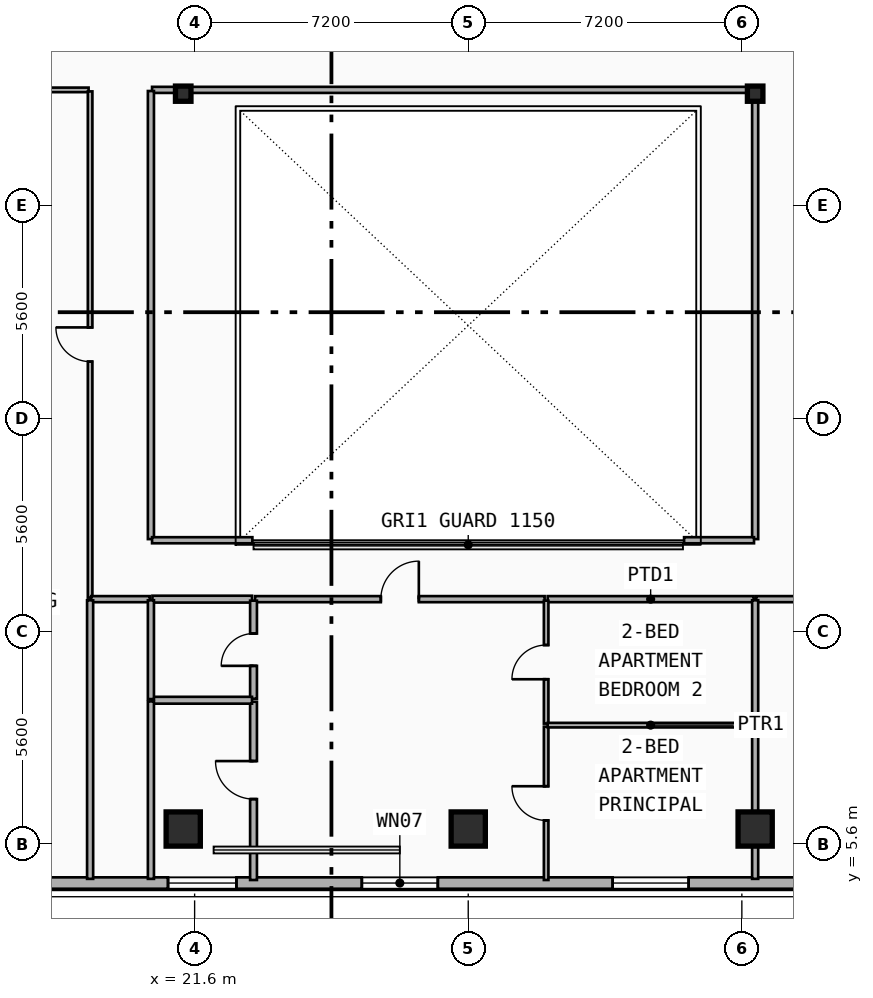
"""IFC4 building model, lengths in metres.
Left out: names, types, materials, properties, quantities, classifications, styles, units other than length and angle.
Written with IfcOpenShell. Run it as: python <this file> out.ifc"""

import sys

from ifc_helpers import new_model, si_unit, direction, frame, frame_2d, origin, origin_2d, place, context, subcontext, project, spatial, rectangle, i_section, extrude, element, fill, save


model = new_model("IFC4")
c1 = context("Model", 3, precision=1e-05, world=origin(), true_north=direction((0.0, 1.0)))
c2 = subcontext(c1, "Body", "Model", "MODEL_VIEW")
j1 = project(units=[si_unit("LENGTHUNIT", "METRE"), si_unit("PLANEANGLEUNIT", "RADIAN")], contexts=[c1])
p1 = place(None, origin())
s1 = spatial("IfcSite", under=j1, at=p1, CompositionType="ELEMENT")
p2 = place(p1, origin())
s2 = spatial("IfcBuilding", under=s1, at=p2, CompositionType="ELEMENT")
p3 = place(p2, frame((0.0, 0.0, 222.0)))
s3 = spatial("IfcBuildingStorey", under=s2, at=p3, CompositionType="ELEMENT", Elevation=222.0)
for number, where, z_axis, x_axis in (
    (1, (21.3, 25.35, 0.0), (0.0, 0.0, 1.0), (1.0, 0.0, 0.0)),
    (2, (36.35, 25.35, 0.0), (0.0, 0.0, 1.0), (1.0, 0.0, 0.0)),
):
    element("IfcColumn", number, at=place(p3, frame(where, z_axis=z_axis, x_axis=x_axis)), inside=s3, PredefinedType="COLUMN", context=c2, shape_type="SweptSolid", body=[
        extrude(i_section(OverallWidth=0.408, OverallDepth=0.4, WebThickness=0.025, FlangeThickness=0.039, FilletRadius=0.015, at=origin_2d()), origin(), (0.0, 0.0, 1.0), 3.6),
    ])
for number, where, z_axis, x_axis in (
    (3, (21.3, 6.11, 0.0), (0.0, -0.09, 0.996), (1.0, 0.0, 0.0)),
    (4, (28.8, 6.11, 0.0), (0.0, -0.09, 0.996), (1.0, 0.0, 0.0)),
    (5, (36.35, 6.11, 0.0), (0.0, -0.09, 0.996), (1.0, 0.0, 0.0)),
):
    element("IfcColumn", number, at=place(p3, frame(where, z_axis=z_axis, x_axis=x_axis)), inside=s3, PredefinedType="COLUMN", context=c2, shape_type="SweptSolid", body=[
        extrude(rectangle(XDim=0.9, YDim=0.9, at=origin_2d()), origin(), (0.0, 0.0, 1.0), 3.615),
    ])
p4 = place(p3, frame((48.0, 4.58, 0.0), z_axis=(0.0, 0.0, 1.0), x_axis=(-1.0, 0.0, 0.0)))
e6 = element("IfcWall", 6, at=p4, inside=s3, PredefinedType="SOLIDWALL", context=c2, shape_type="SweptSolid", body=[
    extrude(rectangle(XDim=38.4, YDim=0.3, at=frame_2d((19.2, 0.0))), origin(), (0.0, 0.0, 1.0), 3.34),
])
p5 = place(p4, frame((36.19, 0.0, 0.48)))
e7 = element("IfcOpeningElement", 7, at=p5, cuts=e6, PredefinedType="OPENING", context=c2, shape_type="SweptSolid", body=[
    extrude(rectangle(XDim=1.8, YDim=1.8, at=frame_2d((0.9, 0.9))), frame((0.0, 0.16, 0.0), z_axis=(0.0, -1.0, 0.0), x_axis=(1.0, 0.0, 0.0)), (0.0, 0.0, 1.0), 0.32),
])
p6 = place(p4, frame((33.912, 0.0, 1.05)))
e8 = element("IfcOpeningElement", 8, at=p6, cuts=e6, PredefinedType="OPENING", context=c2, shape_type="SweptSolid", body=[
    extrude(rectangle(XDim=1.2, YDim=1.5, at=frame_2d((0.6, 0.75))), frame((0.0, 0.16, 0.0), z_axis=(0.0, -1.0, 0.0), x_axis=(1.0, 0.0, 0.0)), (0.0, 0.0, 1.0), 0.32),
])
p7 = place(p4, frame((20.0, 0.0, 0.65)))
e9 = element("IfcOpeningElement", 9, at=p7, cuts=e6, PredefinedType="OPENING", context=c2, shape_type="SweptSolid", body=[
    extrude(rectangle(XDim=2.0, YDim=2.2, at=frame_2d((1.0, 1.1))), frame((0.0, 0.16, 0.0), z_axis=(0.0, -1.0, 0.0), x_axis=(1.0, 0.0, 0.0)), (0.0, 0.0, 1.0), 0.32),
])
p8 = place(p4, frame((25.3, 0.0, 0.48)))
e10 = element("IfcOpeningElement", 10, at=p8, cuts=e6, PredefinedType="OPENING", context=c2, shape_type="SweptSolid", body=[
    extrude(rectangle(XDim=1.8, YDim=1.8, at=frame_2d((0.9, 0.9))), frame((0.0, 0.16, 0.0), z_axis=(0.0, -1.0, 0.0), x_axis=(1.0, 0.0, 0.0)), (0.0, 0.0, 1.0), 0.32),
])
p9 = place(p4, frame((13.4, 0.0, 0.65)))
e11 = element("IfcOpeningElement", 11, at=p9, cuts=e6, PredefinedType="OPENING", context=c2, shape_type="SweptSolid", body=[
    extrude(rectangle(XDim=2.0, YDim=2.2, at=frame_2d((1.0, 1.1))), frame((0.0, 0.16, 0.0), z_axis=(0.0, -1.0, 0.0), x_axis=(1.0, 0.0, 0.0)), (0.0, 0.0, 1.0), 0.32),
])
p10 = place(p4, frame((2.9, 0.0, 0.34)))
e12 = element("IfcOpeningElement", 12, at=p10, cuts=e6, PredefinedType="OPENING", context=c2, shape_type="SweptSolid", body=[
    extrude(rectangle(XDim=1.8, YDim=1.8, at=frame_2d((0.9, 0.9))), frame((0.0, 0.16, 0.0), z_axis=(0.0, -1.0, 0.0), x_axis=(1.0, 0.0, 0.0)), (0.0, 0.0, 1.0), 0.32),
])
p11 = place(p4, frame((0.41, 0.0, 0.48)))
e13 = element("IfcOpeningElement", 13, at=p11, cuts=e6, PredefinedType="OPENING", context=c2, shape_type="SweptSolid", body=[
    extrude(rectangle(XDim=1.8, YDim=1.8, at=frame_2d((0.9, 0.9))), frame((0.0, 0.16, 0.0), z_axis=(0.0, -1.0, 0.0), x_axis=(1.0, 0.0, 0.0)), (0.0, 0.0, 1.0), 0.32),
])
p12 = place(p3, frame((12.24, 25.45, 0.0), z_axis=(0.0, 0.0, 1.0), x_axis=(1.0, 0.0, 0.0)))
e14 = element("IfcWall", 14, at=p12, inside=s3, PredefinedType="PARTITIONING", context=c2, shape_type="SweptSolid", body=[
    extrude(rectangle(XDim=6.57, YDim=0.12, at=frame_2d((3.285, 0.0))), origin(), (0.0, 0.0, 1.0), 2.52),
])
p13 = place(p12, frame((2.835, 0.0, 0.0)))
e15 = element("IfcOpeningElement", 15, at=p13, cuts=e14, PredefinedType="OPENING", context=c2, shape_type="SweptSolid", body=[
    extrude(rectangle(XDim=0.9, YDim=2.1, at=frame_2d((0.45, 1.05))), frame((0.0, 0.07, 0.0), z_axis=(0.0, -1.0, 0.0), x_axis=(1.0, 0.0, 0.0)), (0.0, 0.0, 1.0), 0.14),
])
p14 = place(p3, frame((18.85, 12.09, 0.0), z_axis=(0.0, 0.0, 1.0), x_axis=(0.0, 1.0, 0.0)))
e16 = element("IfcWall", 16, at=p14, inside=s3, PredefinedType="PARTITIONING", context=c2, shape_type="SweptSolid", body=[
    extrude(rectangle(XDim=13.32, YDim=0.12, at=frame_2d((6.66, 0.0))), origin(), (0.0, 0.0, 1.0), 2.82),
])
p15 = place(p14, frame((6.21, 0.0, 0.0)))
e17 = element("IfcOpeningElement", 17, at=p15, cuts=e16, PredefinedType="OPENING", context=c2, shape_type="SweptSolid", body=[
    extrude(rectangle(XDim=0.9, YDim=2.1, at=frame_2d((0.45, 1.05))), frame((0.0, 0.07, 0.0), z_axis=(0.0, -1.0, 0.0), x_axis=(1.0, 0.0, 0.0)), (0.0, 0.0, 1.0), 0.14),
])
p16 = place(p3, frame((23.19, 12.05, 0.0), z_axis=(0.0, 0.0, 1.0), x_axis=(1.0, 0.0, 0.0)))
e18 = element("IfcWall", 18, at=p16, inside=s3, PredefinedType="PARTITIONING", context=c2, shape_type="SweptSolid", body=[
    extrude(rectangle(XDim=7.62, YDim=0.16, at=frame_2d((3.81, 0.0))), origin(), (0.0, 0.0, 1.0), 2.52),
])
p17 = place(p16, frame((3.31, 0.0, 0.0)))
e19 = element("IfcOpeningElement", 19, at=p17, cuts=e18, PredefinedType="OPENING", context=c2, shape_type="SweptSolid", body=[
    extrude(rectangle(XDim=1.0, YDim=2.15, at=frame_2d((0.5, 1.075))), frame((0.0, 0.09, 0.0), z_axis=(0.0, -1.0, 0.0), x_axis=(1.0, 0.0, 0.0)), (0.0, 0.0, 1.0), 0.18),
])
p18 = place(p3, frame((20.49, 12.05, 0.0), z_axis=(0.0, 0.0, 1.0), x_axis=(1.0, 0.0, 0.0)))
e20 = element("IfcWall", 20, at=p18, inside=s3, PredefinedType="PLUMBINGWALL", context=c2, shape_type="SweptSolid", body=[
    extrude(rectangle(XDim=2.62, YDim=0.18, at=frame_2d((1.31, 0.0))), origin(), (0.0, 0.0, 1.0), 2.52),
])
p19 = place(p3, frame((30.89, 12.05, 0.0), z_axis=(0.0, 0.0, 1.0), x_axis=(1.0, 0.0, 0.0)))
e21 = element("IfcWall", 21, at=p19, inside=s3, PredefinedType="PARTITIONING", context=c2, shape_type="SweptSolid", body=[
    extrude(rectangle(XDim=5.42, YDim=0.16, at=frame_2d((2.71, 0.0))), origin(), (0.0, 0.0, 1.0), 2.52),
])
p20 = place(p3, frame((23.15, 4.66, 0.0), z_axis=(0.0, 0.0, 1.0), x_axis=(0.0, 1.0, 0.0)))
e22 = element("IfcWall", 22, at=p20, inside=s3, PredefinedType="PLUMBINGWALL", context=c2, shape_type="SweptSolid", body=[
    extrude(rectangle(XDim=4.69, YDim=0.18, at=frame_2d((2.345, 0.0))), origin(), (0.0, 0.0, 1.0), 2.96),
])
p21 = place(p20, frame((2.129, 0.0, 0.0)))
e23 = element("IfcOpeningElement", 23, at=p21, cuts=e22, PredefinedType="OPENING", context=c2, shape_type="SweptSolid", body=[
    extrude(rectangle(XDim=1.0, YDim=2.15, at=frame_2d((0.5, 1.075))), frame((0.0, 0.1, 0.0), z_axis=(0.0, -1.0, 0.0), x_axis=(1.0, 0.0, 0.0)), (0.0, 0.0, 1.0), 0.2),
])
p22 = place(p3, frame((23.15, 9.43, 0.0), z_axis=(0.0, 0.0, 1.0), x_axis=(0.0, 1.0, 0.0)))
e24 = element("IfcWall", 24, at=p22, inside=s3, PredefinedType="PLUMBINGWALL", context=c2, shape_type="SweptSolid", body=[
    extrude(rectangle(XDim=2.58, YDim=0.18, at=frame_2d((1.29, 0.0))), origin(), (0.0, 0.0, 1.0), 2.96),
])
p23 = place(p22, frame((0.865, 0.0, 0.0)))
e25 = element("IfcOpeningElement", 25, at=p23, cuts=e24, PredefinedType="OPENING", context=c2, shape_type="SweptSolid", body=[
    extrude(rectangle(XDim=0.85, YDim=2.1, at=frame_2d((0.425, 1.05))), frame((0.0, 0.1, 0.0), z_axis=(0.0, -1.0, 0.0), x_axis=(1.0, 0.0, 0.0)), (0.0, 0.0, 1.0), 0.2),
])
p24 = place(p3, frame((30.85, 4.66, 0.0), z_axis=(0.0, 0.0, 1.0), x_axis=(0.0, 1.0, 0.0)))
e26 = element("IfcWall", 26, at=p24, inside=s3, PredefinedType="PARTITIONING", context=c2, shape_type="SweptSolid", body=[
    extrude(rectangle(XDim=4.035, YDim=0.12, at=frame_2d((2.018, 0.0))), origin(), (0.0, 0.0, 1.0), 3.0),
])
p25 = place(p24, frame((1.567, 0.0, 0.0)))
e27 = element("IfcOpeningElement", 27, at=p25, cuts=e26, PredefinedType="OPENING", context=c2, shape_type="SweptSolid", body=[
    extrude(rectangle(XDim=0.9, YDim=2.1, at=frame_2d((0.45, 1.05))), frame((0.0, 0.07, 0.0), z_axis=(0.0, -1.0, 0.0), x_axis=(1.0, 0.0, 0.0)), (0.0, 0.0, 1.0), 0.14),
])
p26 = place(p3, frame((30.85, 8.775, 0.0), z_axis=(0.0, 0.0, 1.0), x_axis=(0.0, 1.0, 0.0)))
e28 = element("IfcWall", 28, at=p26, inside=s3, PredefinedType="PARTITIONING", context=c2, shape_type="SweptSolid", body=[
    extrude(rectangle(XDim=3.235, YDim=0.12, at=frame_2d((1.618, 0.0))), origin(), (0.0, 0.0, 1.0), 2.96),
])
p27 = place(p26, frame((1.167, 0.0, 0.0)))
e29 = element("IfcOpeningElement", 29, at=p27, cuts=e28, PredefinedType="OPENING", context=c2, shape_type="SweptSolid", body=[
    extrude(rectangle(XDim=0.9, YDim=2.1, at=frame_2d((0.45, 1.05))), frame((0.0, 0.07, 0.0), z_axis=(0.0, -1.0, 0.0), x_axis=(1.0, 0.0, 0.0)), (0.0, 0.0, 1.0), 0.14),
])
p28 = place(p3, frame((20.49, 9.39, 0.0), z_axis=(0.0, 0.0, 1.0), x_axis=(1.0, 0.0, 0.0)))
e30 = element("IfcWall", 30, at=p28, inside=s3, PredefinedType="PLUMBINGWALL", context=c2, shape_type="SweptSolid", body=[
    extrude(rectangle(XDim=2.62, YDim=0.18, at=frame_2d((1.31, 0.0))), origin(), (0.0, 0.0, 1.0), 2.52),
])
p29 = place(p3, frame((30.89, 8.735, 0.0), z_axis=(0.0, 0.0, 1.0), x_axis=(1.0, 0.0, 0.0)))
e31 = element("IfcWall", 31, at=p29, inside=s3, PredefinedType="PARTITIONING", context=c2, shape_type="SweptSolid", body=[
    extrude(rectangle(XDim=5.42, YDim=0.12, at=frame_2d((2.71, 0.0))), origin(), (0.0, 0.0, 1.0), 2.52),
])
p30 = place(p3, frame((20.48, 25.45, 0.0), z_axis=(0.0, 0.0, 1.0), x_axis=(1.0, 0.0, 0.0)))
e32 = element("IfcWall", 32, at=p30, inside=s3, PredefinedType="PARTITIONING", context=c2, shape_type="SweptSolid", body=[
    extrude(rectangle(XDim=15.84, YDim=0.16, at=frame_2d((7.92, 0.0))), origin(), (0.0, 0.0, 1.0), 2.52),
])
p31 = place(p3, frame((18.88, 12.05, 0.0), z_axis=(0.0, 0.0, 1.0), x_axis=(1.0, 0.0, 0.0)))
e33 = element("IfcWall", 33, at=p31, inside=s3, PredefinedType="PARTITIONING", context=c2, shape_type="SweptSolid", body=[
    extrude(rectangle(XDim=1.54, YDim=0.16, at=frame_2d((0.77, 0.0))), origin(), (0.0, 0.0, 1.0), 3.34),
])
p32 = place(p3, frame((20.45, 13.63, 0.0), z_axis=(0.0, 0.0, 1.0), x_axis=(0.0, 1.0, 0.0)))
e34 = element("IfcWall", 34, at=p32, inside=s3, PredefinedType="PARTITIONING", context=c2, shape_type="SweptSolid", body=[
    extrude(rectangle(XDim=11.79, YDim=0.16, at=frame_2d((5.895, 0.0))), origin(), (0.0, 0.0, 1.0), 2.82),
])
p33 = place(p3, frame((36.38, 12.05, 0.0), z_axis=(0.0, 0.0, 1.0), x_axis=(1.0, 0.0, 0.0)))
e35 = element("IfcWall", 35, at=p33, inside=s3, PredefinedType="PARTITIONING", context=c2, shape_type="SweptSolid", body=[
    extrude(rectangle(XDim=1.94, YDim=0.16, at=frame_2d((0.97, 0.0))), origin(), (0.0, 0.0, 1.0), 2.52),
])
p34 = place(p3, frame((36.35, 13.63, 0.0), z_axis=(0.0, 0.0, 1.0), x_axis=(0.0, 1.0, 0.0)))
e36 = element("IfcWall", 36, at=p34, inside=s3, PredefinedType="PARTITIONING", context=c2, shape_type="SweptSolid", body=[
    extrude(rectangle(XDim=11.79, YDim=0.16, at=frame_2d((5.895, 0.0))), origin(), (0.0, 0.0, 1.0), 2.52),
])
p35 = place(p3, frame((20.48, 13.6, 0.0), z_axis=(0.0, 0.0, 1.0), x_axis=(1.0, 0.0, 0.0)))
e37 = element("IfcWall", 37, at=p35, inside=s3, PredefinedType="PARTITIONING", context=c2, shape_type="SweptSolid", body=[
    extrude(rectangle(XDim=2.64, YDim=0.16, at=frame_2d((1.32, 0.0))), origin(), (0.0, 0.0, 1.0), 2.52),
])
p36 = place(p3, frame((34.48, 13.6, 0.0), z_axis=(0.0, 0.0, 1.0), x_axis=(1.0, 0.0, 0.0)))
e38 = element("IfcWall", 38, at=p36, inside=s3, PredefinedType="PARTITIONING", context=c2, shape_type="SweptSolid", body=[
    extrude(rectangle(XDim=1.84, YDim=0.16, at=frame_2d((0.92, 0.0))), origin(), (0.0, 0.0, 1.0), 2.52),
])
p37 = place(p3, frame((18.85, 4.69, 0.0), z_axis=(0.0, 0.0, 1.0), x_axis=(0.0, 1.0, 0.0)))
e39 = element("IfcWall", 39, at=p37, inside=s3, PredefinedType="PARTITIONING", context=c2, shape_type="SweptSolid", body=[
    extrude(rectangle(XDim=7.33, YDim=0.16, at=frame_2d((3.665, 0.0))), origin(), (0.0, 0.0, 1.0), 2.82),
])
p38 = place(p3, frame((20.45, 4.69, 0.0), z_axis=(0.0, 0.0, 1.0), x_axis=(0.0, 1.0, 0.0)))
e40 = element("IfcWall", 40, at=p38, inside=s3, PredefinedType="PARTITIONING", context=c2, shape_type="SweptSolid", body=[
    extrude(rectangle(XDim=4.67, YDim=0.16, at=frame_2d((2.335, 0.0))), origin(), (0.0, 0.0, 1.0), 2.82),
])
p39 = place(p3, frame((20.45, 9.42, 0.0), z_axis=(0.0, 0.0, 1.0), x_axis=(0.0, 1.0, 0.0)))
e41 = element("IfcWall", 41, at=p39, inside=s3, PredefinedType="PARTITIONING", context=c2, shape_type="SweptSolid", body=[
    extrude(rectangle(XDim=2.6, YDim=0.16, at=frame_2d((1.3, 0.0))), origin(), (0.0, 0.0, 1.0), 2.82),
])
p40 = place(p3, frame((36.35, 4.69, 0.0), z_axis=(0.0, 0.0, 1.0), x_axis=(0.0, 1.0, 0.0)))
e42 = element("IfcWall", 42, at=p40, inside=s3, PredefinedType="PARTITIONING", context=c2, shape_type="SweptSolid", body=[
    extrude(rectangle(XDim=4.015, YDim=0.16, at=frame_2d((2.008, 0.0))), origin(), (0.0, 0.0, 1.0), 2.52),
])
p41 = place(p3, frame((36.35, 8.765, 0.0), z_axis=(0.0, 0.0, 1.0), x_axis=(0.0, 1.0, 0.0)))
e43 = element("IfcWall", 43, at=p41, inside=s3, PredefinedType="PARTITIONING", context=c2, shape_type="SweptSolid", body=[
    extrude(rectangle(XDim=3.255, YDim=0.16, at=frame_2d((1.627, 0.0))), origin(), (0.0, 0.0, 1.0), 2.52),
])
p42 = place(p7, origin())
e44 = element("IfcWindow", 44, at=p42, inside=s3, PartitioningType="SINGLE_PANEL", PredefinedType="WINDOW", context=c2, shape_type="SweptSolid", body=[
    extrude(rectangle(XDim=2.0, YDim=2.2, at=frame_2d((1.0, 1.1))), frame((0.0, 0.03, 0.0), z_axis=(0.0, -1.0, 0.0), x_axis=(1.0, 0.0, 0.0)), (0.0, 0.0, 1.0), 0.06),
])
fill(e9, e44)
p43 = place(p8, origin())
e45 = element("IfcWindow", 45, at=p43, inside=s3, PartitioningType="SINGLE_PANEL", PredefinedType="WINDOW", context=c2, shape_type="SweptSolid", body=[
    extrude(rectangle(XDim=1.8, YDim=1.8, at=frame_2d((0.9, 0.9))), frame((0.0, 0.03, 0.0), z_axis=(0.0, -1.0, 0.0), x_axis=(1.0, 0.0, 0.0)), (0.0, 0.0, 1.0), 0.06),
])
fill(e10, e45)
p44 = place(p9, origin())
e46 = element("IfcWindow", 46, at=p44, inside=s3, PartitioningType="SINGLE_PANEL", PredefinedType="WINDOW", context=c2, shape_type="SweptSolid", body=[
    extrude(rectangle(XDim=2.0, YDim=2.2, at=frame_2d((1.0, 1.1))), frame((0.0, 0.03, 0.0), z_axis=(0.0, -1.0, 0.0), x_axis=(1.0, 0.0, 0.0)), (0.0, 0.0, 1.0), 0.06),
])
fill(e11, e46)
p45 = place(p15, origin())
e47 = element("IfcDoor", 47, at=p45, inside=s3, OperationType="SINGLE_SWING_RIGHT", PredefinedType="DOOR", context=c2, shape_type="SweptSolid", body=[
    extrude(rectangle(XDim=0.9, YDim=2.1, at=frame_2d((0.45, 1.05))), frame((0.0, 0.025, 0.0), z_axis=(0.0, -1.0, 0.0), x_axis=(1.0, 0.0, 0.0)), (0.0, 0.0, 1.0), 0.05),
])
fill(e17, e47)
p46 = place(p17, origin())
e48 = element("IfcDoor", 48, at=p46, inside=s3, OperationType="SINGLE_SWING_RIGHT", PredefinedType="DOOR", context=c2, shape_type="SweptSolid", body=[
    extrude(rectangle(XDim=1.0, YDim=2.15, at=frame_2d((0.5, 1.075))), frame((0.0, 0.025, 0.0), z_axis=(0.0, -1.0, 0.0), x_axis=(1.0, 0.0, 0.0)), (0.0, 0.0, 1.0), 0.05),
])
fill(e19, e48)
p47 = place(p21, origin())
e49 = element("IfcDoor", 49, at=p47, inside=s3, OperationType="SINGLE_SWING_RIGHT", PredefinedType="DOOR", context=c2, shape_type="SweptSolid", body=[
    extrude(rectangle(XDim=1.0, YDim=2.15, at=frame_2d((0.5, 1.075))), frame((0.0, 0.025, 0.0), z_axis=(0.0, -1.0, 0.0), x_axis=(1.0, 0.0, 0.0)), (0.0, 0.0, 1.0), 0.05),
])
fill(e23, e49)
p48 = place(p23, origin())
e50 = element("IfcDoor", 50, at=p48, inside=s3, OperationType="SINGLE_SWING_LEFT", PredefinedType="DOOR", context=c2, shape_type="SweptSolid", body=[
    extrude(rectangle(XDim=0.85, YDim=2.1, at=frame_2d((0.425, 1.05))), frame((0.0, 0.025, 0.0), z_axis=(0.0, -1.0, 0.0), x_axis=(1.0, 0.0, 0.0)), (0.0, 0.0, 1.0), 0.05),
])
fill(e25, e50)
p49 = place(p25, origin())
e51 = element("IfcDoor", 51, at=p49, inside=s3, OperationType="SINGLE_SWING_RIGHT", PredefinedType="DOOR", context=c2, shape_type="SweptSolid", body=[
    extrude(rectangle(XDim=0.9, YDim=2.1, at=frame_2d((0.45, 1.05))), frame((0.0, 0.025, 0.0), z_axis=(0.0, -1.0, 0.0), x_axis=(1.0, 0.0, 0.0)), (0.0, 0.0, 1.0), 0.05),
])
fill(e27, e51)
p50 = place(p27, origin())
e52 = element("IfcDoor", 52, at=p50, inside=s3, OperationType="SINGLE_SWING_LEFT", PredefinedType="DOOR", context=c2, shape_type="SweptSolid", body=[
    extrude(rectangle(XDim=0.9, YDim=2.1, at=frame_2d((0.45, 1.05))), frame((0.0, 0.025, 0.0), z_axis=(0.0, -1.0, 0.0), x_axis=(1.0, 0.0, 0.0)), (0.0, 0.0, 1.0), 0.05),
])
fill(e29, e52)
save(model, sys.argv[1])
